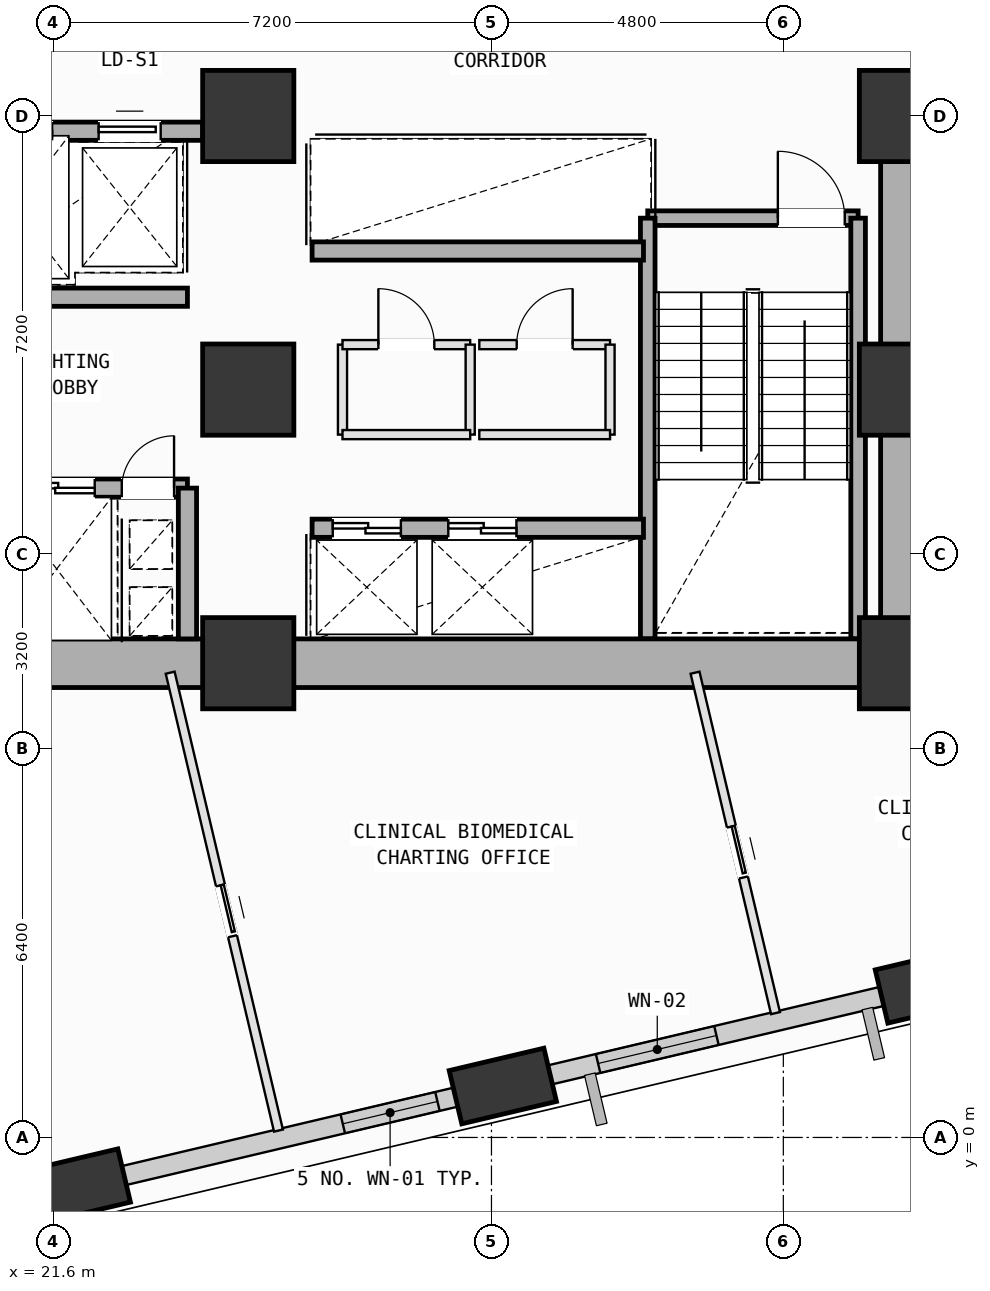
"""IFC4 building model, lengths in metres.
Left out: names, types, materials, properties, quantities, classifications, styles, units other than length and angle.
Written with IfcOpenShell. Run it as: python <this file> out.ifc"""

import sys

from ifc_helpers import new_model, si_unit, direction, frame, frame_2d, origin, origin_2d, place, context, subcontext, project, spatial, rectangle, extrude, element, fill, save


model = new_model("IFC4")
c1 = context("Model", 3, precision=1e-05, world=origin(), true_north=direction((0.0, 1.0)))
c2 = subcontext(c1, "Body", "Model", "MODEL_VIEW")
j1 = project(units=[si_unit("LENGTHUNIT", "METRE"), si_unit("PLANEANGLEUNIT", "RADIAN")], contexts=[c1])
p1 = place(None, origin())
s1 = spatial("IfcSite", under=j1, at=p1, CompositionType="ELEMENT")
p2 = place(p1, origin())
s2 = spatial("IfcBuilding", under=s1, at=p2, CompositionType="ELEMENT")
p3 = place(p2, frame((0.0, 0.0, 79.0)))
s3 = spatial("IfcBuildingStorey", under=s2, at=p3, CompositionType="ELEMENT", Elevation=79.0)
for number, where, z_axis, x_axis in (
    (1, (24.8, 7.8, 0.0), (0.0, 0.0, 1.0), (1.0, 0.0, 0.0)),
    (2, (24.8, 12.3, 0.0), (0.0, 0.0, 1.0), (1.0, 0.0, 0.0)),
    (3, (24.8, 16.8, 0.0), (0.0, 0.0, 1.0), (1.0, 0.0, 0.0)),
    (4, (35.6, 7.8, 0.0), (0.0, 0.0, 1.0), (1.0, 0.0, 0.0)),
    (5, (35.6, 12.3, 0.0), (0.0, 0.0, 1.0), (1.0, 0.0, 0.0)),
    (6, (35.6, 16.8, 0.0), (0.0, 0.0, 1.0), (1.0, 0.0, 0.0)),
):
    element("IfcColumn", number, at=place(p3, frame(where, z_axis=z_axis, x_axis=x_axis)), inside=s3, PredefinedType="COLUMN", context=c2, shape_type="SweptSolid", body=[
        extrude(rectangle(XDim=1.5, YDim=1.5, at=origin_2d()), origin(), (0.0, 0.0, 1.0), 4.0),
    ])
p4 = place(p3, frame((21.98, -0.81, 0.002), z_axis=(0.105804523447, -0.046969297792, 0.993277044879), x_axis=(0.186010672696, 0.982186756856, 0.026630889967)))
e7 = element("IfcColumn", 7, at=p4, inside=s3, PredefinedType="COLUMN", context=c2, shape_type="SweptSolid", body=[
    extrude(rectangle(XDim=1.6, YDim=0.9, at=origin_2d()), origin(), (0.0, 0.0, 1.0), 3.95),
])
p5 = place(p3, frame((28.987, 0.846, 0.002), z_axis=(0.098936866845, -0.018218711435, 0.994926919393), x_axis=(-0.048855407687, 0.998537704387, 0.023143077958)))
e8 = element("IfcColumn", 8, at=p5, inside=s3, PredefinedType="COLUMN", context=c2, shape_type="SweptSolid", body=[
    extrude(rectangle(XDim=1.6, YDim=0.9, at=origin_2d()), origin(), (0.0, 0.0, 1.0), 3.953),
])
p6 = place(p3, frame((35.994, 2.503, 0.002), z_axis=(0.091910802022, 0.010616963027, 0.995710642992), x_axis=(-0.339222831521, 0.940465222119, 0.021284655504)))
e9 = element("IfcColumn", 9, at=p6, inside=s3, PredefinedType="COLUMN", context=c2, shape_type="SweptSolid", body=[
    extrude(rectangle(XDim=1.6, YDim=0.9, at=origin_2d()), origin(), (0.0, 0.0, 1.0), 3.955),
])
p7 = place(p3, frame((21.585, -0.903, 0.0), z_axis=(0.0, 0.0, 1.0), x_axis=(-0.973180001823, -0.230044960936, 0.0)))
e10 = element("IfcWall", 10, at=p7, inside=s3, PredefinedType="SOLIDWALL", context=c2, shape_type="SweptSolid", body=[
    extrude(rectangle(XDim=6.034, YDim=0.32, at=frame_2d((3.017, 0.0))), origin(), (0.0, 0.0, 1.0), 3.085),
])
p8 = place(p7, frame((3.392, 0.0, 0.75)))
e11 = element("IfcOpeningElement", 11, at=p8, cuts=e10, PredefinedType="OPENING", context=c2, shape_type="SweptSolid", body=[
    extrude(rectangle(XDim=1.2, YDim=1.75, at=frame_2d((0.6, 0.875))), frame((0.0, 0.17, 0.0), z_axis=(0.0, -1.0, 0.0), x_axis=(1.0, 0.0, 0.0)), (0.0, 0.0, 1.0), 0.34),
])
p9 = place(p3, frame((28.581, 0.75, 0.0), z_axis=(0.0, 0.0, 1.0), x_axis=(-0.973180476265, -0.230042953851, 0.0)))
e12 = element("IfcWall", 12, at=p9, inside=s3, PredefinedType="SOLIDWALL", context=c2, shape_type="SweptSolid", body=[
    extrude(rectangle(XDim=6.006, YDim=0.32, at=frame_2d((3.003, 0.0))), origin(), (0.0, 0.0, 1.0), 3.085),
])
p10 = place(p9, frame((0.688, 0.0, 0.75)))
e13 = element("IfcOpeningElement", 13, at=p10, cuts=e12, PredefinedType="OPENING", context=c2, shape_type="SweptSolid", body=[
    extrude(rectangle(XDim=1.6, YDim=1.95, at=frame_2d((0.8, 0.975))), frame((0.0, 0.17, 0.0), z_axis=(0.0, -1.0, 0.0), x_axis=(1.0, 0.0, 0.0)), (0.0, 0.0, 1.0), 0.34),
])
p11 = place(p3, frame((35.582, 2.406, 0.0), z_axis=(0.0, 0.0, 1.0), x_axis=(-0.973170177917, -0.23008651593, 0.0)))
e14 = element("IfcWall", 14, at=p11, inside=s3, PredefinedType="SOLIDWALL", context=c2, shape_type="SweptSolid", body=[
    extrude(rectangle(XDim=5.99, YDim=0.32, at=frame_2d((2.995, 0.0))), origin(), (0.0, 0.0, 1.0), 3.085),
])
p12 = place(p11, frame((3.167, 0.0, 0.75)))
e15 = element("IfcOpeningElement", 15, at=p12, cuts=e14, PredefinedType="OPENING", context=c2, shape_type="SweptSolid", body=[
    extrude(rectangle(XDim=2.0, YDim=1.95, at=frame_2d((1.0, 0.975))), frame((0.0, 0.17, 0.0), z_axis=(0.0, -1.0, 0.0), x_axis=(1.0, 0.0, 0.0)), (0.0, 0.0, 1.0), 0.34),
])
p13 = place(p3, frame((31.37, 15.12, 0.0), z_axis=(0.0, 0.0, 1.0), x_axis=(1.0, 0.0, 0.0)))
e16 = element("IfcWall", 16, at=p13, inside=s3, PredefinedType="SOLIDWALL", context=c2, shape_type="SweptSolid", body=[
    extrude(rectangle(XDim=3.46, YDim=0.24, at=frame_2d((1.73, 0.0))), origin(), (0.0, 0.0, 1.0), 3.7),
])
p14 = place(p13, frame((2.14, 0.0, 0.0)))
e17 = element("IfcOpeningElement", 17, at=p14, cuts=e16, PredefinedType="OPENING", context=c2, shape_type="SweptSolid", body=[
    extrude(rectangle(XDim=1.1, YDim=2.15, at=frame_2d((0.55, 1.075))), frame((0.0, 0.13, 0.0), z_axis=(0.0, -1.0, 0.0), x_axis=(1.0, 0.0, 0.0)), (0.0, 0.0, 1.0), 0.26),
])
for number, where, z_axis, x_axis in (
    (18, (34.83, 15.12, 0.0), (0.0, 0.0, 1.0), (0.0, -1.0, 0.0)),
    (19, (31.37, 8.2, 0.0), (0.0, 0.0, 1.0), (0.0, 1.0, 0.0)),
):
    element("IfcWall", number, at=place(p3, frame(where, z_axis=z_axis, x_axis=x_axis)), inside=s3, PredefinedType="SOLIDWALL", context=c2, shape_type="SweptSolid", body=[
        extrude(rectangle(XDim=6.92, YDim=0.24, at=frame_2d((3.46, 0.0))), origin(), (0.0, 0.0, 1.0), 3.7),
    ])
for number, where, z_axis, x_axis in (
    (20, (14.0, 7.8, 0.0), (0.0, 0.0, 1.0), (1.0, 0.0, 0.0)),
    (21, (24.8, 7.8, 0.0), (0.0, 0.0, 1.0), (1.0, 0.0, 0.0)),
):
    element("IfcWall", number, at=place(p3, frame(where, z_axis=z_axis, x_axis=x_axis)), inside=s3, PredefinedType="SHEAR", context=c2, shape_type="SweptSolid", body=[
        extrude(rectangle(XDim=10.8, YDim=0.8, at=frame_2d((5.4, 0.0))), origin(), (0.0, 0.0, 1.0), 3.7),
    ])
p15 = place(p3, frame((35.6, 7.8, 0.0), z_axis=(0.0, 0.0, 1.0), x_axis=(0.0, 1.0, 0.0)))
e22 = element("IfcWall", 22, at=p15, inside=s3, PredefinedType="SHEAR", context=c2, shape_type="SweptSolid", body=[
    extrude(rectangle(XDim=9.0, YDim=0.8, at=frame_2d((4.5, 0.0))), origin(), (0.0, 0.0, 1.0), 3.7),
])
p16 = place(p3, frame((19.85, 16.55, 0.0), z_axis=(0.0, 0.0, 1.0), x_axis=(1.0, 0.0, 0.0)))
e23 = element("IfcWall", 23, at=p16, inside=s3, PredefinedType="SOLIDWALL", context=c2, shape_type="SweptSolid", body=[
    extrude(rectangle(XDim=4.2, YDim=0.3, at=frame_2d((2.1, 0.0))), origin(), (0.0, 0.0, 1.0), 3.7),
])
p17 = place(p16, frame((0.475, 0.0, 0.0)))
e24 = element("IfcOpeningElement", 24, at=p17, cuts=e23, PredefinedType="OPENING", context=c2, shape_type="SweptSolid", body=[
    extrude(rectangle(XDim=1.25, YDim=2.18, at=frame_2d((0.625, 1.09))), frame((0.0, 0.16, 0.0), z_axis=(0.0, -1.0, 0.0), x_axis=(1.0, 0.0, 0.0)), (0.0, 0.0, 1.0), 0.32),
])
p18 = place(p16, frame((2.49, 0.0, 0.0)))
e25 = element("IfcOpeningElement", 25, at=p18, cuts=e23, PredefinedType="OPENING", context=c2, shape_type="SweptSolid", body=[
    extrude(rectangle(XDim=1.02, YDim=2.12, at=frame_2d((0.51, 1.06))), frame((0.0, 0.16, 0.0), z_axis=(0.0, -1.0, 0.0), x_axis=(1.0, 0.0, 0.0)), (0.0, 0.0, 1.0), 0.32),
])
p19 = place(p3, frame((18.5, 10.68, 0.0), z_axis=(0.0, 0.0, 1.0), x_axis=(1.0, 0.0, 0.0)))
e26 = element("IfcWall", 26, at=p19, inside=s3, PredefinedType="SOLIDWALL", context=c2, shape_type="SweptSolid", body=[
    extrude(rectangle(XDim=5.3, YDim=0.3, at=frame_2d((2.65, 0.0))), origin(), (0.0, 0.0, 1.0), 3.7),
])
p20 = place(p19, frame((4.22, 0.0, 0.0)))
e27 = element("IfcOpeningElement", 27, at=p20, cuts=e26, PredefinedType="OPENING", context=c2, shape_type="SweptSolid", body=[
    extrude(rectangle(XDim=0.86, YDim=2.06, at=frame_2d((0.43, 1.03))), frame((0.0, 0.16, 0.0), z_axis=(0.0, -1.0, 0.0), x_axis=(1.0, 0.0, 0.0)), (0.0, 0.0, 1.0), 0.32),
])
p21 = place(p19, frame((0.425, 0.0, 0.0)))
e28 = element("IfcOpeningElement", 28, at=p21, cuts=e26, PredefinedType="OPENING", context=c2, shape_type="SweptSolid", body=[
    extrude(rectangle(XDim=1.25, YDim=2.18, at=frame_2d((0.625, 1.09))), frame((0.0, 0.16, 0.0), z_axis=(0.0, -1.0, 0.0), x_axis=(1.0, 0.0, 0.0)), (0.0, 0.0, 1.0), 0.32),
])
p22 = place(p19, frame((2.525, 0.0, 0.0)))
e29 = element("IfcOpeningElement", 29, at=p22, cuts=e26, PredefinedType="OPENING", context=c2, shape_type="SweptSolid", body=[
    extrude(rectangle(XDim=1.25, YDim=2.18, at=frame_2d((0.625, 1.09))), frame((0.0, 0.16, 0.0), z_axis=(0.0, -1.0, 0.0), x_axis=(1.0, 0.0, 0.0)), (0.0, 0.0, 1.0), 0.32),
])
p23 = place(p3, frame((18.5, 13.82, 0.0), z_axis=(0.0, 0.0, 1.0), x_axis=(1.0, 0.0, 0.0)))
e30 = element("IfcWall", 30, at=p23, inside=s3, PredefinedType="SOLIDWALL", context=c2, shape_type="SweptSolid", body=[
    extrude(rectangle(XDim=5.3, YDim=0.3, at=frame_2d((2.65, 0.0))), origin(), (0.0, 0.0, 1.0), 3.7),
])
p24 = place(p23, frame((0.18, 0.0, 0.0)))
e31 = element("IfcOpeningElement", 31, at=p24, cuts=e30, PredefinedType="OPENING", context=c2, shape_type="SweptSolid", body=[
    extrude(rectangle(XDim=1.1, YDim=2.15, at=frame_2d((0.55, 1.075))), frame((0.0, 0.16, 0.0), z_axis=(0.0, -1.0, 0.0), x_axis=(1.0, 0.0, 0.0)), (0.0, 0.0, 1.0), 0.32),
])
p25 = place(p3, frame((23.8, 8.2, 0.0), z_axis=(0.0, 0.0, 1.0), x_axis=(0.0, 1.0, 0.0)))
e32 = element("IfcWall", 32, at=p25, inside=s3, PredefinedType="SOLIDWALL", context=c2, shape_type="SweptSolid", body=[
    extrude(rectangle(XDim=2.48, YDim=0.3, at=frame_2d((1.24, 0.0))), origin(), (0.0, 0.0, 1.0), 3.7),
])
p26 = place(p3, frame((25.85, 10.02, 0.0), z_axis=(0.0, 0.0, 1.0), x_axis=(1.0, 0.0, 0.0)))
e33 = element("IfcWall", 33, at=p26, inside=s3, PredefinedType="SOLIDWALL", context=c2, shape_type="SweptSolid", body=[
    extrude(rectangle(XDim=5.45, YDim=0.3, at=frame_2d((2.725, 0.0))), origin(), (0.0, 0.0, 1.0), 3.7),
])
p27 = place(p26, frame((0.34, 0.0, 0.0)))
e34 = element("IfcOpeningElement", 34, at=p27, cuts=e33, PredefinedType="OPENING", context=c2, shape_type="SweptSolid", body=[
    extrude(rectangle(XDim=1.12, YDim=2.15, at=frame_2d((0.56, 1.075))), frame((0.0, 0.16, 0.0), z_axis=(0.0, -1.0, 0.0), x_axis=(1.0, 0.0, 0.0)), (0.0, 0.0, 1.0), 0.32),
])
p28 = place(p26, frame((2.24, 0.0, 0.0)))
e35 = element("IfcOpeningElement", 35, at=p28, cuts=e33, PredefinedType="OPENING", context=c2, shape_type="SweptSolid", body=[
    extrude(rectangle(XDim=1.12, YDim=2.15, at=frame_2d((0.56, 1.075))), frame((0.0, 0.16, 0.0), z_axis=(0.0, -1.0, 0.0), x_axis=(1.0, 0.0, 0.0)), (0.0, 0.0, 1.0), 0.32),
])
p29 = place(p3, frame((25.85, 14.58, 0.0), z_axis=(0.0, 0.0, 1.0), x_axis=(1.0, 0.0, 0.0)))
e36 = element("IfcWall", 36, at=p29, inside=s3, PredefinedType="SOLIDWALL", context=c2, shape_type="SweptSolid", body=[
    extrude(rectangle(XDim=5.45, YDim=0.3, at=frame_2d((2.725, 0.0))), origin(), (0.0, 0.0, 1.0), 3.7),
])
p30 = place(p3, frame((26.35, 11.56, 0.0), z_axis=(0.0, 0.0, 1.0), x_axis=(0.0, 1.0, 0.0)))
e37 = element("IfcWall", 37, at=p30, inside=s3, PredefinedType="PARTITIONING", context=c2, shape_type="SweptSolid", body=[
    extrude(rectangle(XDim=1.48, YDim=0.15, at=frame_2d((0.74, 0.0))), origin(), (0.0, 0.0, 1.0), 3.7),
])
p31 = place(p3, frame((26.35, 13.04, 0.0), z_axis=(0.0, 0.0, 1.0), x_axis=(1.0, 0.0, 0.0)))
e38 = element("IfcWall", 38, at=p31, inside=s3, PredefinedType="PARTITIONING", context=c2, shape_type="SweptSolid", body=[
    extrude(rectangle(XDim=2.1, YDim=0.15, at=frame_2d((1.05, 0.0))), origin(), (0.0, 0.0, 1.0), 3.7),
])
p32 = place(p31, frame((0.59, 0.0, 0.0)))
e39 = element("IfcOpeningElement", 39, at=p32, cuts=e38, PredefinedType="OPENING", context=c2, shape_type="SweptSolid", body=[
    extrude(rectangle(XDim=0.92, YDim=2.1, at=frame_2d((0.46, 1.05))), frame((0.0, 0.085, 0.0), z_axis=(0.0, -1.0, 0.0), x_axis=(1.0, 0.0, 0.0)), (0.0, 0.0, 1.0), 0.17),
])
p33 = place(p3, frame((28.45, 13.04, 0.0), z_axis=(0.0, 0.0, 1.0), x_axis=(0.0, -1.0, 0.0)))
e40 = element("IfcWall", 40, at=p33, inside=s3, PredefinedType="PARTITIONING", context=c2, shape_type="SweptSolid", body=[
    extrude(rectangle(XDim=1.48, YDim=0.15, at=frame_2d((0.74, 0.0))), origin(), (0.0, 0.0, 1.0), 3.7),
])
p34 = place(p3, frame((28.45, 11.56, 0.0), z_axis=(0.0, 0.0, 1.0), x_axis=(-1.0, 0.0, 0.0)))
e41 = element("IfcWall", 41, at=p34, inside=s3, PredefinedType="PARTITIONING", context=c2, shape_type="SweptSolid", body=[
    extrude(rectangle(XDim=2.1, YDim=0.15, at=frame_2d((1.05, 0.0))), origin(), (0.0, 0.0, 1.0), 3.7),
])
p35 = place(p3, frame((28.6, 13.04, 0.0), z_axis=(0.0, 0.0, 1.0), x_axis=(1.0, 0.0, 0.0)))
e42 = element("IfcWall", 42, at=p35, inside=s3, PredefinedType="PARTITIONING", context=c2, shape_type="SweptSolid", body=[
    extrude(rectangle(XDim=2.15, YDim=0.15, at=frame_2d((1.075, 0.0))), origin(), (0.0, 0.0, 1.0), 3.7),
])
p36 = place(p35, frame((0.615, 0.0, 0.0)))
e43 = element("IfcOpeningElement", 43, at=p36, cuts=e42, PredefinedType="OPENING", context=c2, shape_type="SweptSolid", body=[
    extrude(rectangle(XDim=0.92, YDim=2.1, at=frame_2d((0.46, 1.05))), frame((0.0, 0.085, 0.0), z_axis=(0.0, -1.0, 0.0), x_axis=(1.0, 0.0, 0.0)), (0.0, 0.0, 1.0), 0.17),
])
p37 = place(p3, frame((30.75, 13.04, 0.0), z_axis=(0.0, 0.0, 1.0), x_axis=(0.0, -1.0, 0.0)))
e44 = element("IfcWall", 44, at=p37, inside=s3, PredefinedType="PARTITIONING", context=c2, shape_type="SweptSolid", body=[
    extrude(rectangle(XDim=1.48, YDim=0.15, at=frame_2d((0.74, 0.0))), origin(), (0.0, 0.0, 1.0), 3.7),
])
p38 = place(p3, frame((30.75, 11.56, 0.0), z_axis=(0.0, 0.0, 1.0), x_axis=(-1.0, 0.0, 0.0)))
e45 = element("IfcWall", 45, at=p38, inside=s3, PredefinedType="PARTITIONING", context=c2, shape_type="SweptSolid", body=[
    extrude(rectangle(XDim=2.15, YDim=0.15, at=frame_2d((1.075, 0.0))), origin(), (0.0, 0.0, 1.0), 3.7),
])
p39 = place(p3, frame((22.789, -0.855, 0.0), z_axis=(0.0, 0.0, 1.0), x_axis=(-0.973205611237, -0.229936596165, 0.0)))
e46 = element("IfcWall", 46, at=p39, inside=s3, PredefinedType="PARTITIONING", context=c2, shape_type="SweptSolid", body=[
    extrude(rectangle(XDim=1.183, YDim=0.15, at=frame_2d((0.591, 0.0))), origin(), (0.0, 0.0, 1.0), 3.085),
])
p40 = place(p3, frame((23.516, 7.644, 0.0), z_axis=(0.0, 0.0, 1.0), x_axis=(0.230141707273, -0.973157127382, 0.0)))
e47 = element("IfcWall", 47, at=p40, inside=s3, PredefinedType="PARTITIONING", context=c2, shape_type="SweptSolid", body=[
    extrude(rectangle(XDim=7.739, YDim=0.15, at=frame_2d((3.869, 0.0))), origin(), (0.0, 0.0, 1.0), 3.7),
])
p41 = place(p40, frame((3.594, 0.0, 0.0)))
e48 = element("IfcOpeningElement", 48, at=p41, cuts=e47, PredefinedType="OPENING", context=c2, shape_type="SweptSolid", body=[
    extrude(rectangle(XDim=0.86, YDim=2.06, at=frame_2d((0.43, 1.03))), frame((0.0, 0.085, 0.0), z_axis=(0.0, -1.0, 0.0), x_axis=(1.0, 0.0, 0.0)), (0.0, 0.0, 1.0), 0.17),
])
p42 = place(p3, frame((29.806, 0.804, 0.0), z_axis=(0.0, 0.0, 1.0), x_axis=(-0.972982103607, -0.230880545002, 0.0)))
e49 = element("IfcWall", 49, at=p42, inside=s3, PredefinedType="PARTITIONING", context=c2, shape_type="SweptSolid", body=[
    extrude(rectangle(XDim=1.204, YDim=0.15, at=frame_2d((0.602, 0.0))), origin(), (0.0, 0.0, 1.0), 3.085),
])
p43 = place(p3, frame((32.148, 7.644, 0.0), z_axis=(0.0, 0.0, 1.0), x_axis=(0.22995457353, -0.9732013636, 0.0)))
e50 = element("IfcWall", 50, at=p43, inside=s3, PredefinedType="PARTITIONING", context=c2, shape_type="SweptSolid", body=[
    extrude(rectangle(XDim=5.753, YDim=0.15, at=frame_2d((2.877, 0.0))), origin(), (0.0, 0.0, 1.0), 3.7),
])
p44 = place(p43, frame((2.601, 0.0, 0.0)))
e51 = element("IfcOpeningElement", 51, at=p44, cuts=e50, PredefinedType="OPENING", context=c2, shape_type="SweptSolid", body=[
    extrude(rectangle(XDim=0.86, YDim=2.06, at=frame_2d((0.43, 1.03))), frame((0.0, 0.085, 0.0), z_axis=(0.0, -1.0, 0.0), x_axis=(1.0, 0.0, 0.0)), (0.0, 0.0, 1.0), 0.17),
])
p45 = place(p3, frame((36.818, 2.461, 0.0), z_axis=(0.0, 0.0, 1.0), x_axis=(-0.973293226806, -0.229565447429, 0.0)))
e52 = element("IfcWall", 52, at=p45, inside=s3, PredefinedType="PARTITIONING", context=c2, shape_type="SweptSolid", body=[
    extrude(rectangle(XDim=1.216, YDim=0.15, at=frame_2d((0.608, 0.0))), origin(), (0.0, 0.0, 1.0), 3.085),
])
p46 = place(p10, origin())
e53 = element("IfcWindow", 53, at=p46, inside=s3, PartitioningType="SINGLE_PANEL", PredefinedType="WINDOW", context=c2, shape_type="SweptSolid", body=[
    extrude(rectangle(XDim=1.6, YDim=1.95, at=frame_2d((0.8, 0.975))), frame((0.0, 0.03, 0.0), z_axis=(0.0, -1.0, 0.0), x_axis=(1.0, 0.0, 0.0)), (0.0, 0.0, 1.0), 0.06),
])
fill(e13, e53)
p47 = place(p12, origin())
e54 = element("IfcWindow", 54, at=p47, inside=s3, PartitioningType="SINGLE_PANEL", PredefinedType="WINDOW", context=c2, shape_type="SweptSolid", body=[
    extrude(rectangle(XDim=2.0, YDim=1.95, at=frame_2d((1.0, 0.975))), frame((0.0, 0.03, 0.0), z_axis=(0.0, -1.0, 0.0), x_axis=(1.0, 0.0, 0.0)), (0.0, 0.0, 1.0), 0.06),
])
fill(e15, e54)
p48 = place(p14, origin())
e55 = element("IfcDoor", 55, at=p48, inside=s3, OperationType="SINGLE_SWING_LEFT", PredefinedType="DOOR", context=c2, shape_type="SweptSolid", body=[
    extrude(rectangle(XDim=1.1, YDim=2.15, at=frame_2d((0.55, 1.075))), frame((0.0, 0.025, 0.0), z_axis=(0.0, -1.0, 0.0), x_axis=(1.0, 0.0, 0.0)), (0.0, 0.0, 1.0), 0.05),
])
fill(e17, e55)
p49 = place(p20, origin())
e56 = element("IfcDoor", 56, at=p49, inside=s3, OperationType="SINGLE_SWING_RIGHT", PredefinedType="DOOR", context=c2, shape_type="SweptSolid", body=[
    extrude(rectangle(XDim=0.86, YDim=2.06, at=frame_2d((0.43, 1.03))), frame((0.0, 0.025, 0.0), z_axis=(0.0, -1.0, 0.0), x_axis=(1.0, 0.0, 0.0)), (0.0, 0.0, 1.0), 0.05),
])
fill(e27, e56)
p50 = place(p22, origin())
e57 = element("IfcDoor", 57, at=p50, inside=s3, OperationType="DOUBLE_DOOR_SLIDING", PredefinedType="DOOR", context=c2, shape_type="SweptSolid", body=[
    extrude(rectangle(XDim=1.25, YDim=2.18, at=frame_2d((0.625, 1.09))), frame((0.0, 0.025, 0.0), z_axis=(0.0, -1.0, 0.0), x_axis=(1.0, 0.0, 0.0)), (0.0, 0.0, 1.0), 0.05),
])
fill(e29, e57)
p51 = place(p27, origin())
e58 = element("IfcDoor", 58, at=p51, inside=s3, OperationType="DOUBLE_DOOR_SLIDING", PredefinedType="DOOR", context=c2, shape_type="SweptSolid", body=[
    extrude(rectangle(XDim=1.12, YDim=2.15, at=frame_2d((0.56, 1.075))), frame((0.0, 0.025, 0.0), z_axis=(0.0, -1.0, 0.0), x_axis=(1.0, 0.0, 0.0)), (0.0, 0.0, 1.0), 0.05),
])
fill(e34, e58)
p52 = place(p28, origin())
e59 = element("IfcDoor", 59, at=p52, inside=s3, OperationType="DOUBLE_DOOR_SLIDING", PredefinedType="DOOR", context=c2, shape_type="SweptSolid", body=[
    extrude(rectangle(XDim=1.12, YDim=2.15, at=frame_2d((0.56, 1.075))), frame((0.0, 0.025, 0.0), z_axis=(0.0, -1.0, 0.0), x_axis=(1.0, 0.0, 0.0)), (0.0, 0.0, 1.0), 0.05),
])
fill(e35, e59)
p53 = place(p18, origin())
e60 = element("IfcDoor", 60, at=p53, inside=s3, OperationType="SLIDING_TO_LEFT", PredefinedType="DOOR", context=c2, shape_type="SweptSolid", body=[
    extrude(rectangle(XDim=1.02, YDim=2.12, at=frame_2d((0.51, 1.06))), frame((0.0, 0.025, 0.0), z_axis=(0.0, -1.0, 0.0), x_axis=(1.0, 0.0, 0.0)), (0.0, 0.0, 1.0), 0.05),
])
fill(e25, e60)
p54 = place(p32, origin())
e61 = element("IfcDoor", 61, at=p54, inside=s3, OperationType="SINGLE_SWING_LEFT", PredefinedType="DOOR", context=c2, shape_type="SweptSolid", body=[
    extrude(rectangle(XDim=0.92, YDim=2.1, at=frame_2d((0.46, 1.05))), frame((0.0, 0.025, 0.0), z_axis=(0.0, -1.0, 0.0), x_axis=(1.0, 0.0, 0.0)), (0.0, 0.0, 1.0), 0.05),
])
fill(e39, e61)
p55 = place(p36, origin())
e62 = element("IfcDoor", 62, at=p55, inside=s3, OperationType="SINGLE_SWING_RIGHT", PredefinedType="DOOR", context=c2, shape_type="SweptSolid", body=[
    extrude(rectangle(XDim=0.92, YDim=2.1, at=frame_2d((0.46, 1.05))), frame((0.0, 0.025, 0.0), z_axis=(0.0, -1.0, 0.0), x_axis=(1.0, 0.0, 0.0)), (0.0, 0.0, 1.0), 0.05),
])
fill(e43, e62)
p56 = place(p44, origin())
e63 = element("IfcDoor", 63, at=p56, inside=s3, OperationType="SLIDING_TO_LEFT", PredefinedType="DOOR", context=c2, shape_type="SweptSolid", body=[
    extrude(rectangle(XDim=0.86, YDim=2.06, at=frame_2d((0.43, 1.03))), frame((0.0, 0.025, 0.0), z_axis=(0.0, -1.0, 0.0), x_axis=(1.0, 0.0, 0.0)), (0.0, 0.0, 1.0), 0.05),
])
fill(e51, e63)
p57 = place(p41, origin())
e64 = element("IfcDoor", 64, at=p57, inside=s3, OperationType="SLIDING_TO_LEFT", PredefinedType="DOOR", context=c2, shape_type="SweptSolid", body=[
    extrude(rectangle(XDim=0.86, YDim=2.06, at=frame_2d((0.43, 1.03))), frame((0.0, 0.025, 0.0), z_axis=(0.0, -1.0, 0.0), x_axis=(1.0, 0.0, 0.0)), (0.0, 0.0, 1.0), 0.05),
])
fill(e48, e64)
save(model, sys.argv[1])
